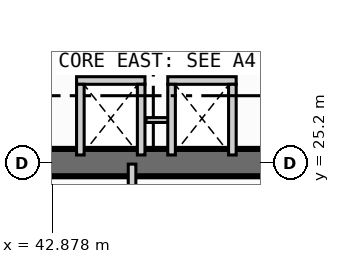
"""IFC4 building model, lengths in metres.
Left out: names, types, materials, properties, quantities, classifications, styles, units other than length and angle.
Written with IfcOpenShell. Run it as: python <this file> out.ifc"""

import sys

from ifc_helpers import new_model, si_unit, direction, frame, frame_2d, origin, place, context, subcontext, project, spatial, rectangle, extrude, element, save


model = new_model("IFC4")
c1 = context("Model", 3, precision=1e-05, world=origin(), true_north=direction((0.0, 1.0)))
c2 = subcontext(c1, "Body", "Model", "MODEL_VIEW")
j1 = project(units=[si_unit("LENGTHUNIT", "METRE"), si_unit("PLANEANGLEUNIT", "RADIAN")], contexts=[c1])
p1 = place(None, origin())
s1 = spatial("IfcSite", under=j1, at=p1, CompositionType="ELEMENT")
p2 = place(p1, origin())
s2 = spatial("IfcBuilding", under=s1, at=p2, CompositionType="ELEMENT")
p3 = place(p2, frame((0.0, 0.0, 70.0)))
s3 = spatial("IfcBuildingStorey", under=s2, at=p3, CompositionType="ELEMENT", Elevation=70.0)
p4 = place(p3, frame((42.2, 25.2, 0.0), z_axis=(0.0, 0.0, 1.0), x_axis=(1.0, 0.0, 0.0)))
e1 = element("IfcWall", 1, at=p4, inside=s3, PredefinedType="SHEAR", context=c2, shape_type="SweptSolid", body=[
    extrude(rectangle(XDim=8.6, YDim=0.9, at=frame_2d((4.3, 0.0))), origin(), (0.0, 0.0, 1.0), 3.55),
])
p5 = place(p3, frame((45.5, 21.0, 0.0), z_axis=(0.0, 0.0, 1.0), x_axis=(0.0, 1.0, 0.0)))
e2 = element("IfcWall", 2, at=p5, inside=s3, PredefinedType="SOLIDWALL", context=c2, shape_type="SweptSolid", body=[
    extrude(rectangle(XDim=4.15, YDim=0.25, at=frame_2d((2.075, 0.0))), origin(), (0.0, 0.0, 1.0), 3.55),
])
p6 = place(p5, frame((0.65, 0.0, 0.0)))
e3 = element("IfcOpeningElement", 3, at=p6, cuts=e2, PredefinedType="OPENING", context=c2, shape_type="SweptSolid", body=[
    extrude(rectangle(XDim=1.1, YDim=2.15, at=frame_2d((0.55, 1.075))), frame((0.0, 0.135, 0.0), z_axis=(0.0, -1.0, 0.0), x_axis=(1.0, 0.0, 0.0)), (0.0, 0.0, 1.0), 0.27),
])
p7 = place(p3, frame((43.675, 27.9, 0.0), z_axis=(0.0, 0.0, 1.0), x_axis=(1.0, 0.0, 0.0)))
e4 = element("IfcWall", 4, at=p7, inside=s3, PredefinedType="SOLIDWALL", context=c2, shape_type="SweptSolid", body=[
    extrude(rectangle(XDim=2.25, YDim=0.25, at=frame_2d((1.125, 0.0))), origin(), (0.0, 0.0, 1.0), 3.55),
])
for number, where, z_axis, x_axis in (
    (5, (43.8, 25.45, 0.0), (0.0, 0.0, 1.0), (0.0, 1.0, 0.0)),
    (6, (45.8, 25.45, 0.0), (0.0, 0.0, 1.0), (0.0, 1.0, 0.0)),
):
    element("IfcWall", number, at=place(p3, frame(where, z_axis=z_axis, x_axis=x_axis)), inside=s3, PredefinedType="SOLIDWALL", context=c2, shape_type="SweptSolid", body=[
        extrude(rectangle(XDim=2.325, YDim=0.25, at=frame_2d((1.163, 0.0))), origin(), (0.0, 0.0, 1.0), 3.55),
    ])
p8 = place(p3, frame((45.96, 26.6, 0.0), z_axis=(0.0, 0.0, 1.0), x_axis=(1.0, 0.0, 0.0)))
e7 = element("IfcWall", 7, at=p8, inside=s3, PredefinedType="PARTITIONING", context=c2, shape_type="SweptSolid", body=[
    extrude(rectangle(XDim=0.88, YDim=0.16, at=frame_2d((0.44, 0.0))), origin(), (0.0, 0.0, 1.0), 3.55),
])
p9 = place(p3, frame((46.675, 27.9, 0.0), z_axis=(0.0, 0.0, 1.0), x_axis=(1.0, 0.0, 0.0)))
e8 = element("IfcWall", 8, at=p9, inside=s3, PredefinedType="SOLIDWALL", context=c2, shape_type="SweptSolid", body=[
    extrude(rectangle(XDim=2.25, YDim=0.25, at=frame_2d((1.125, 0.0))), origin(), (0.0, 0.0, 1.0), 3.55),
])
for number, where, z_axis, x_axis in (
    (9, (46.8, 25.45, 0.0), (0.0, 0.0, 1.0), (0.0, 1.0, 0.0)),
    (10, (48.8, 25.45, 0.0), (0.0, 0.0, 1.0), (0.0, 1.0, 0.0)),
):
    element("IfcWall", number, at=place(p3, frame(where, z_axis=z_axis, x_axis=x_axis)), inside=s3, PredefinedType="SOLIDWALL", context=c2, shape_type="SweptSolid", body=[
        extrude(rectangle(XDim=2.325, YDim=0.25, at=frame_2d((1.163, 0.0))), origin(), (0.0, 0.0, 1.0), 3.55),
    ])
save(model, sys.argv[1])
